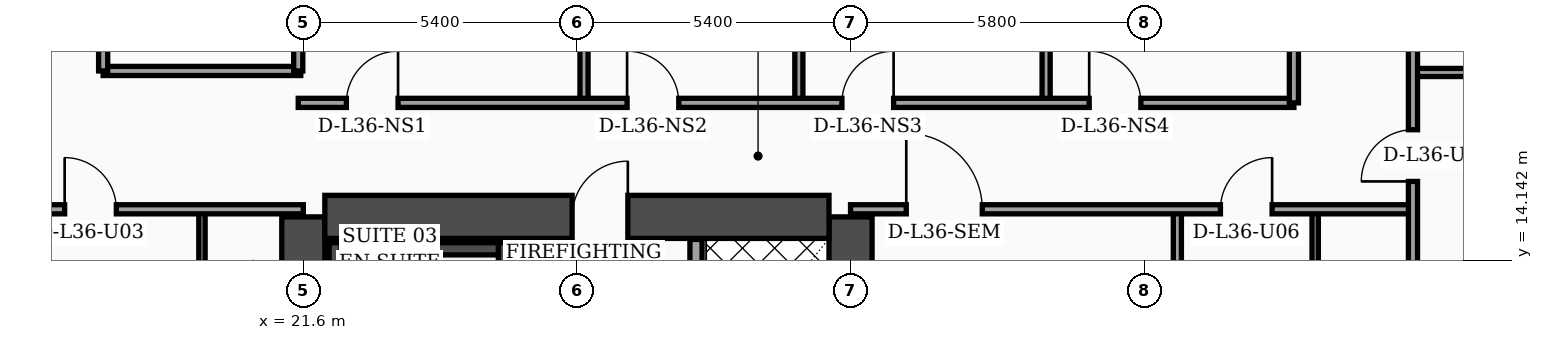
"""IFC4 building model, lengths in metres.
Left out: names, types, materials, properties, quantities, classifications, styles, units other than length and angle.
Written with IfcOpenShell. Run it as: python <this file> out.ifc"""

import sys

from ifc_helpers import new_model, si_unit, direction, frame, frame_2d, origin, place, context, subcontext, project, spatial, rectangle, extrude, element, fill, save


model = new_model("IFC4")
c1 = context("Model", 3, precision=1e-05, world=origin(), true_north=direction((0.0, 1.0)))
c2 = subcontext(c1, "Body", "Model", "MODEL_VIEW")
j1 = project(units=[si_unit("LENGTHUNIT", "METRE"), si_unit("PLANEANGLEUNIT", "RADIAN")], contexts=[c1])
p1 = place(None, origin())
s1 = spatial("IfcSite", under=j1, at=p1, CompositionType="ELEMENT")
p2 = place(p1, origin())
s2 = spatial("IfcBuilding", under=s1, at=p2, CompositionType="ELEMENT")
p3 = place(p2, frame((0.0, 0.0, 148.5)))
s3 = spatial("IfcBuildingStorey", under=s2, at=p3, CompositionType="ELEMENT", Elevation=148.5)
for number, where, z_axis, x_axis in (
    (1, (21.6, 4.6, 0.0), (0.0, 0.0, 1.0), (0.0, 1.0, 0.0)),
    (2, (32.4, 4.6, 0.0), (0.0, 0.0, 1.0), (0.0, 1.0, 0.0)),
):
    element("IfcWall", number, at=place(p3, frame(where, z_axis=z_axis, x_axis=x_axis)), inside=s3, PredefinedType="SHEAR", context=c2, shape_type="SweptSolid", body=[
        extrude(rectangle(XDim=10.4, YDim=0.85, at=frame_2d((5.2, 0.0))), origin(), (0.0, 0.0, 1.0), 3.56),
    ])
p4 = place(p3, frame((22.025, 15.0, 0.0), z_axis=(0.0, 0.0, 1.0), x_axis=(1.0, 0.0, 0.0)))
e3 = element("IfcWall", 3, at=p4, inside=s3, PredefinedType="SHEAR", context=c2, shape_type="SweptSolid", body=[
    extrude(rectangle(XDim=9.95, YDim=0.85, at=frame_2d((4.975, 0.0))), origin(), (0.0, 0.0, 1.0), 3.56),
])
p5 = place(p4, frame((4.88, 0.0, 0.0)))
e4 = element("IfcOpeningElement", 4, at=p5, cuts=e3, PredefinedType="OPENING", context=c2, shape_type="SweptSolid", body=[
    extrude(rectangle(XDim=1.1, YDim=2.2, at=frame_2d((0.55, 1.1))), frame((0.0, 0.435, 0.0), z_axis=(0.0, -1.0, 0.0), x_axis=(1.0, 0.0, 0.0)), (0.0, 0.0, 1.0), 0.87),
])
p6 = place(p3, frame((22.23, 5.025, 0.0), z_axis=(0.0, 0.0, 1.0), x_axis=(0.0, 1.0, 0.0)))
e5 = element("IfcWall", 5, at=p6, inside=s3, PredefinedType="SOLIDWALL", context=c2, shape_type="SweptSolid", body=[
    extrude(rectangle(XDim=9.465, YDim=0.24, at=frame_2d((4.732, 0.0))), origin(), (0.0, 0.0, 1.0), 3.56),
])
p7 = place(p3, frame((25.57, 5.025, 0.0), z_axis=(0.0, 0.0, 1.0), x_axis=(0.0, 1.0, 0.0)))
e6 = element("IfcWall", 6, at=p7, inside=s3, PredefinedType="SOLIDWALL", context=c2, shape_type="SweptSolid", body=[
    extrude(rectangle(XDim=9.465, YDim=0.24, at=frame_2d((4.732, 0.0))), origin(), (0.0, 0.0, 1.0), 3.56),
])
p8 = place(p7, frame((0.35, 0.0, 0.0)))
e7 = element("IfcOpeningElement", 7, at=p8, cuts=e6, PredefinedType="OPENING", context=c2, shape_type="SweptSolid", body=[
    extrude(rectangle(XDim=1.15, YDim=2.2, at=frame_2d((0.575, 1.1))), frame((0.0, 0.13, 0.0), z_axis=(0.0, -1.0, 0.0), x_axis=(1.0, 0.0, 0.0)), (0.0, 0.0, 1.0), 0.26),
])
p9 = place(p3, frame((22.35, 14.37, 0.0), z_axis=(0.0, 0.0, 1.0), x_axis=(1.0, 0.0, 0.0)))
e8 = element("IfcWall", 8, at=p9, inside=s3, PredefinedType="SOLIDWALL", context=c2, shape_type="SweptSolid", body=[
    extrude(rectangle(XDim=3.1, YDim=0.24, at=frame_2d((1.55, 0.0))), origin(), (0.0, 0.0, 1.0), 3.56),
])
p10 = place(p3, frame((29.35, 5.045, 0.0), z_axis=(0.0, 0.0, 1.0), x_axis=(0.0, 1.0, 0.0)))
e9 = element("IfcWall", 9, at=p10, inside=s3, PredefinedType="SOLIDWALL", context=c2, shape_type="SweptSolid", body=[
    extrude(rectangle(XDim=9.51, YDim=0.24, at=frame_2d((4.755, 0.0))), origin(), (0.0, 0.0, 1.0), 3.56),
])
p11 = place(p10, frame((0.55, 0.0, 0.0)))
e10 = element("IfcOpeningElement", 10, at=p11, cuts=e9, PredefinedType="OPENING", context=c2, shape_type="SweptSolid", body=[
    extrude(rectangle(XDim=1.3, YDim=2.35, at=frame_2d((0.65, 1.175))), frame((0.0, 0.13, 0.0), z_axis=(0.0, -1.0, 0.0), x_axis=(1.0, 0.0, 0.0)), (0.0, 0.0, 1.0), 0.26),
])
p12 = place(p3, frame((19.6, 2.44, 0.0), z_axis=(0.0, 0.0, 1.0), x_axis=(0.0, 1.0, 0.0)))
e11 = element("IfcWall", 11, at=p12, inside=s3, PredefinedType="PARTITIONING", context=c2, shape_type="SweptSolid", body=[
    extrude(rectangle(XDim=12.71, YDim=0.125, at=frame_2d((6.355, 0.0))), origin(), (0.0, 0.0, 1.0), 2.49),
])
p13 = place(p12, frame((4.34, 0.0, 0.0)))
e12 = element("IfcOpeningElement", 12, at=p13, cuts=e11, PredefinedType="OPENING", context=c2, shape_type="SweptSolid", body=[
    extrude(rectangle(XDim=0.96, YDim=2.2, at=frame_2d((0.48, 1.1))), frame((0.0, 0.073, 0.0), z_axis=(0.0, -1.0, 0.0), x_axis=(1.0, 0.0, 0.0)), (0.0, 0.0, 1.0), 0.145),
])
p14 = place(p12, frame((10.18, 0.0, 0.0)))
e13 = element("IfcOpeningElement", 13, at=p14, cuts=e11, PredefinedType="OPENING", context=c2, shape_type="SweptSolid", body=[
    extrude(rectangle(XDim=0.9, YDim=2.15, at=frame_2d((0.45, 1.075))), frame((0.0, 0.073, 0.0), z_axis=(0.0, -1.0, 0.0), x_axis=(1.0, 0.0, 0.0)), (0.0, 0.0, 1.0), 0.145),
])
p15 = place(p3, frame((15.15, 15.15, 0.0), z_axis=(0.0, 0.0, 1.0), x_axis=(1.0, 0.0, 0.0)))
e14 = element("IfcWall", 14, at=p15, inside=s3, PredefinedType="PARTITIONING", context=c2, shape_type="SweptSolid", body=[
    extrude(rectangle(XDim=6.45, YDim=0.18, at=frame_2d((3.225, 0.0))), origin(), (0.0, 0.0, 1.0), 2.49),
])
p16 = place(p15, frame((1.74, 0.0, 0.0)))
e15 = element("IfcOpeningElement", 15, at=p16, cuts=e14, PredefinedType="OPENING", context=c2, shape_type="SweptSolid", body=[
    extrude(rectangle(XDim=1.02, YDim=2.2, at=frame_2d((0.51, 1.1))), frame((0.0, 0.1, 0.0), z_axis=(0.0, -1.0, 0.0), x_axis=(1.0, 0.0, 0.0)), (0.0, 0.0, 1.0), 0.2),
])
p17 = place(p3, frame((17.65, 17.88, 0.0), z_axis=(0.0, 0.0, 1.0), x_axis=(1.0, 0.0, 0.0)))
e16 = element("IfcWall", 16, at=p17, inside=s3, PredefinedType="PARTITIONING", context=c2, shape_type="SweptSolid", body=[
    extrude(rectangle(XDim=3.9, YDim=0.18, at=frame_2d((1.95, 0.0))), origin(), (0.0, 0.0, 1.0), 3.09),
])
p18 = place(p3, frame((21.5, 17.88, 0.0), z_axis=(0.0, 0.0, 1.0), x_axis=(0.0, 1.0, 0.0)))
e17 = element("IfcWall", 17, at=p18, inside=s3, PredefinedType="PARTITIONING", context=c2, shape_type="SweptSolid", body=[
    extrude(rectangle(XDim=6.44, YDim=0.18, at=frame_2d((3.22, 0.0))), origin(), (0.0, 0.0, 1.0), 3.09),
])
p19 = place(p3, frame((17.65, 17.88, 0.0), z_axis=(0.0, 0.0, 1.0), x_axis=(0.0, 1.0, 0.0)))
e18 = element("IfcWall", 18, at=p19, inside=s3, PredefinedType="PARTITIONING", context=c2, shape_type="SweptSolid", body=[
    extrude(rectangle(XDim=6.44, YDim=0.18, at=frame_2d((3.22, 0.0))), origin(), (0.0, 0.0, 1.0), 3.09),
])
p20 = place(p19, frame((0.65, 0.0, 0.0)))
e19 = element("IfcOpeningElement", 19, at=p20, cuts=e18, PredefinedType="OPENING", context=c2, shape_type="SweptSolid", body=[
    extrude(rectangle(XDim=0.98, YDim=2.15, at=frame_2d((0.49, 1.075))), frame((0.0, 0.1, 0.0), z_axis=(0.0, -1.0, 0.0), x_axis=(1.0, 0.0, 0.0)), (0.0, 0.0, 1.0), 0.2),
])
p21 = place(p19, frame((3.97, 0.0, 0.0)))
e20 = element("IfcOpeningElement", 20, at=p21, cuts=e18, PredefinedType="OPENING", context=c2, shape_type="SweptSolid", body=[
    extrude(rectangle(XDim=0.96, YDim=2.2, at=frame_2d((0.48, 1.1))), frame((0.0, 0.1, 0.0), z_axis=(0.0, -1.0, 0.0), x_axis=(1.0, 0.0, 0.0)), (0.0, 0.0, 1.0), 0.2),
])
p22 = place(p3, frame((41.57, 2.44, 0.0), z_axis=(0.0, 0.0, 1.0), x_axis=(0.0, 1.0, 0.0)))
e21 = element("IfcWall", 21, at=p22, inside=s3, PredefinedType="PARTITIONING", context=c2, shape_type="SweptSolid", body=[
    extrude(rectangle(XDim=12.71, YDim=0.125, at=frame_2d((6.355, 0.0))), origin(), (0.0, 0.0, 1.0), 3.04),
])
p23 = place(p22, frame((4.35, 0.0, 0.0)))
e22 = element("IfcOpeningElement", 22, at=p23, cuts=e21, PredefinedType="OPENING", context=c2, shape_type="SweptSolid", body=[
    extrude(rectangle(XDim=0.96, YDim=2.2, at=frame_2d((0.48, 1.1))), frame((0.0, 0.073, 0.0), z_axis=(0.0, -1.0, 0.0), x_axis=(1.0, 0.0, 0.0)), (0.0, 0.0, 1.0), 0.145),
])
p24 = place(p22, frame((10.21, 0.0, 0.0)))
e23 = element("IfcOpeningElement", 23, at=p24, cuts=e21, PredefinedType="OPENING", context=c2, shape_type="SweptSolid", body=[
    extrude(rectangle(XDim=0.9, YDim=2.15, at=frame_2d((0.45, 1.075))), frame((0.0, 0.073, 0.0), z_axis=(0.0, -1.0, 0.0), x_axis=(1.0, 0.0, 0.0)), (0.0, 0.0, 1.0), 0.145),
])
p25 = place(p3, frame((38.85, 2.44, 0.0), z_axis=(0.0, 0.0, 1.0), x_axis=(0.0, 1.0, 0.0)))
e24 = element("IfcWall", 24, at=p25, inside=s3, PredefinedType="PARTITIONING", context=c2, shape_type="SweptSolid", body=[
    extrude(rectangle(XDim=12.71, YDim=0.16, at=frame_2d((6.355, 0.0))), origin(), (0.0, 0.0, 1.0), 2.94),
])
p26 = place(p3, frame((32.4, 15.15, 0.0), z_axis=(0.0, 0.0, 1.0), x_axis=(1.0, 0.0, 0.0)))
e25 = element("IfcWall", 25, at=p26, inside=s3, PredefinedType="PARTITIONING", context=c2, shape_type="SweptSolid", body=[
    extrude(rectangle(XDim=11.1, YDim=0.18, at=frame_2d((5.55, 0.0))), origin(), (0.0, 0.0, 1.0), 2.94),
])
p27 = place(p26, frame((1.1, 0.0, 0.0)))
e26 = element("IfcOpeningElement", 26, at=p27, cuts=e25, PredefinedType="OPENING", context=c2, shape_type="SweptSolid", body=[
    extrude(rectangle(XDim=1.5, YDim=2.22, at=frame_2d((0.75, 1.11))), frame((0.0, 0.1, 0.0), z_axis=(0.0, -1.0, 0.0), x_axis=(1.0, 0.0, 0.0)), (0.0, 0.0, 1.0), 0.2),
])
p28 = place(p26, frame((7.3, 0.0, 0.0)))
e27 = element("IfcOpeningElement", 27, at=p28, cuts=e25, PredefinedType="OPENING", context=c2, shape_type="SweptSolid", body=[
    extrude(rectangle(XDim=1.02, YDim=2.2, at=frame_2d((0.51, 1.1))), frame((0.0, 0.1, 0.0), z_axis=(0.0, -1.0, 0.0), x_axis=(1.0, 0.0, 0.0)), (0.0, 0.0, 1.0), 0.2),
])
p29 = place(p3, frame((27.14, 17.25, 0.0), z_axis=(0.0, 0.0, 1.0), x_axis=(0.0, 1.0, 0.0)))
e28 = element("IfcWall", 28, at=p29, inside=s3, PredefinedType="PARTITIONING", context=c2, shape_type="SweptSolid", body=[
    extrude(rectangle(XDim=10.32, YDim=0.16, at=frame_2d((5.16, 0.0))), origin(), (0.0, 0.0, 1.0), 2.94),
])
p30 = place(p3, frame((31.38, 17.25, 0.0), z_axis=(0.0, 0.0, 1.0), x_axis=(0.0, 1.0, 0.0)))
e29 = element("IfcWall", 29, at=p30, inside=s3, PredefinedType="PARTITIONING", context=c2, shape_type="SweptSolid", body=[
    extrude(rectangle(XDim=12.68, YDim=0.16, at=frame_2d((6.34, 0.0))), origin(), (0.0, 0.0, 1.0), 2.94),
])
p31 = place(p3, frame((36.26, 17.25, 0.0), z_axis=(0.0, 0.0, 1.0), x_axis=(0.0, 1.0, 0.0)))
e30 = element("IfcWall", 30, at=p31, inside=s3, PredefinedType="PARTITIONING", context=c2, shape_type="SweptSolid", body=[
    extrude(rectangle(XDim=15.4, YDim=0.16, at=frame_2d((7.7, 0.0))), origin(), (0.0, 0.0, 1.0), 2.94),
])
p32 = place(p3, frame((21.5, 17.25, 0.0), z_axis=(0.0, 0.0, 1.0), x_axis=(1.0, 0.0, 0.0)))
e31 = element("IfcWall", 31, at=p32, inside=s3, PredefinedType="PARTITIONING", context=c2, shape_type="SweptSolid", body=[
    extrude(rectangle(XDim=19.65, YDim=0.18, at=frame_2d((9.825, 0.0))), origin(), (0.0, 0.0, 1.0), 2.94),
])
p33 = place(p32, frame((0.95, 0.0, 0.0)))
e32 = element("IfcOpeningElement", 32, at=p33, cuts=e31, PredefinedType="OPENING", context=c2, shape_type="SweptSolid", body=[
    extrude(rectangle(XDim=1.02, YDim=2.2, at=frame_2d((0.51, 1.1))), frame((0.0, 0.1, 0.0), z_axis=(0.0, -1.0, 0.0), x_axis=(1.0, 0.0, 0.0)), (0.0, 0.0, 1.0), 0.2),
])
p34 = place(p32, frame((6.49, 0.0, 0.0)))
e33 = element("IfcOpeningElement", 33, at=p34, cuts=e31, PredefinedType="OPENING", context=c2, shape_type="SweptSolid", body=[
    extrude(rectangle(XDim=1.02, YDim=2.2, at=frame_2d((0.51, 1.1))), frame((0.0, 0.1, 0.0), z_axis=(0.0, -1.0, 0.0), x_axis=(1.0, 0.0, 0.0)), (0.0, 0.0, 1.0), 0.2),
])
p35 = place(p32, frame((10.73, 0.0, 0.0)))
e34 = element("IfcOpeningElement", 34, at=p35, cuts=e31, PredefinedType="OPENING", context=c2, shape_type="SweptSolid", body=[
    extrude(rectangle(XDim=1.02, YDim=2.2, at=frame_2d((0.51, 1.1))), frame((0.0, 0.1, 0.0), z_axis=(0.0, -1.0, 0.0), x_axis=(1.0, 0.0, 0.0)), (0.0, 0.0, 1.0), 0.2),
])
p36 = place(p32, frame((15.61, 0.0, 0.0)))
e35 = element("IfcOpeningElement", 35, at=p36, cuts=e31, PredefinedType="OPENING", context=c2, shape_type="SweptSolid", body=[
    extrude(rectangle(XDim=1.02, YDim=2.2, at=frame_2d((0.51, 1.1))), frame((0.0, 0.1, 0.0), z_axis=(0.0, -1.0, 0.0), x_axis=(1.0, 0.0, 0.0)), (0.0, 0.0, 1.0), 0.2),
])
p37 = place(p3, frame((41.15, 17.25, 0.0), z_axis=(0.0, 0.0, 1.0), x_axis=(0.0, 1.0, 0.0)))
e36 = element("IfcWall", 36, at=p37, inside=s3, PredefinedType="PARTITIONING", context=c2, shape_type="SweptSolid", body=[
    extrude(rectangle(XDim=18.13, YDim=0.18, at=frame_2d((9.065, 0.0))), origin(), (0.0, 0.0, 1.0), 2.94),
])
p38 = place(p3, frame((43.5, 17.85, 0.0), z_axis=(0.0, 0.0, 1.0), x_axis=(1.0, 0.0, 0.0)))
e37 = element("IfcWall", 37, at=p38, inside=s3, PredefinedType="PARTITIONING", context=c2, shape_type="SweptSolid", body=[
    extrude(rectangle(XDim=11.78, YDim=0.16, at=frame_2d((5.89, 0.0))), origin(), (0.0, 0.0, 1.0), 2.94),
])
p39 = place(p3, frame((43.5, 2.44, 0.0), z_axis=(0.0, 0.0, 1.0), x_axis=(0.0, 1.0, 0.0)))
e38 = element("IfcWall", 38, at=p39, inside=s3, PredefinedType="PARTITIONING", context=c2, shape_type="SweptSolid", body=[
    extrude(rectangle(XDim=31.04, YDim=0.18, at=frame_2d((15.52, 0.0))), origin(), (0.0, 0.0, 1.0), 2.94),
])
p40 = place(p39, frame((13.26, 0.0, 0.0)))
e39 = element("IfcOpeningElement", 39, at=p40, cuts=e38, PredefinedType="OPENING", context=c2, shape_type="SweptSolid", body=[
    extrude(rectangle(XDim=1.02, YDim=2.2, at=frame_2d((0.51, 1.1))), frame((0.0, 0.1, 0.0), z_axis=(0.0, -1.0, 0.0), x_axis=(1.0, 0.0, 0.0)), (0.0, 0.0, 1.0), 0.2),
])
p41 = place(p39, frame((17.77, 0.0, 0.0)))
e40 = element("IfcOpeningElement", 40, at=p41, cuts=e38, PredefinedType="OPENING", context=c2, shape_type="SweptSolid", body=[
    extrude(rectangle(XDim=1.02, YDim=2.2, at=frame_2d((0.51, 1.1))), frame((0.0, 0.1, 0.0), z_axis=(0.0, -1.0, 0.0), x_axis=(1.0, 0.0, 0.0)), (0.0, 0.0, 1.0), 0.2),
])
p42 = place(p39, frame((25.58, 0.0, 0.0)))
e41 = element("IfcOpeningElement", 41, at=p42, cuts=e38, PredefinedType="OPENING", context=c2, shape_type="SweptSolid", body=[
    extrude(rectangle(XDim=1.02, YDim=2.2, at=frame_2d((0.51, 1.1))), frame((0.0, 0.1, 0.0), z_axis=(0.0, -1.0, 0.0), x_axis=(1.0, 0.0, 0.0)), (0.0, 0.0, 1.0), 0.2),
])
p43 = place(p16, origin())
e42 = element("IfcDoor", 42, at=p43, inside=s3, OperationType="SINGLE_SWING_LEFT", PredefinedType="DOOR", context=c2, shape_type="SweptSolid", body=[
    extrude(rectangle(XDim=1.02, YDim=2.2, at=frame_2d((0.51, 1.1))), frame((0.0, 0.025, 0.0), z_axis=(0.0, -1.0, 0.0), x_axis=(1.0, 0.0, 0.0)), (0.0, 0.0, 1.0), 0.05),
])
fill(e15, e42)
p44 = place(p27, origin())
e43 = element("IfcDoor", 43, at=p44, inside=s3, OperationType="SINGLE_SWING_LEFT", PredefinedType="DOOR", context=c2, shape_type="SweptSolid", body=[
    extrude(rectangle(XDim=1.5, YDim=2.22, at=frame_2d((0.75, 1.11))), frame((0.0, 0.025, 0.0), z_axis=(0.0, -1.0, 0.0), x_axis=(1.0, 0.0, 0.0)), (0.0, 0.0, 1.0), 0.05),
])
fill(e26, e43)
p45 = place(p28, origin())
e44 = element("IfcDoor", 44, at=p45, inside=s3, OperationType="SINGLE_SWING_RIGHT", PredefinedType="DOOR", context=c2, shape_type="SweptSolid", body=[
    extrude(rectangle(XDim=1.02, YDim=2.2, at=frame_2d((0.51, 1.1))), frame((0.0, 0.025, 0.0), z_axis=(0.0, -1.0, 0.0), x_axis=(1.0, 0.0, 0.0)), (0.0, 0.0, 1.0), 0.05),
])
fill(e27, e44)
p46 = place(p33, origin())
e45 = element("IfcDoor", 45, at=p46, inside=s3, OperationType="SINGLE_SWING_RIGHT", PredefinedType="DOOR", context=c2, shape_type="SweptSolid", body=[
    extrude(rectangle(XDim=1.02, YDim=2.2, at=frame_2d((0.51, 1.1))), frame((0.0, 0.025, 0.0), z_axis=(0.0, -1.0, 0.0), x_axis=(1.0, 0.0, 0.0)), (0.0, 0.0, 1.0), 0.05),
])
fill(e32, e45)
p47 = place(p34, origin())
e46 = element("IfcDoor", 46, at=p47, inside=s3, OperationType="SINGLE_SWING_LEFT", PredefinedType="DOOR", context=c2, shape_type="SweptSolid", body=[
    extrude(rectangle(XDim=1.02, YDim=2.2, at=frame_2d((0.51, 1.1))), frame((0.0, 0.025, 0.0), z_axis=(0.0, -1.0, 0.0), x_axis=(1.0, 0.0, 0.0)), (0.0, 0.0, 1.0), 0.05),
])
fill(e33, e46)
p48 = place(p35, origin())
e47 = element("IfcDoor", 47, at=p48, inside=s3, OperationType="SINGLE_SWING_RIGHT", PredefinedType="DOOR", context=c2, shape_type="SweptSolid", body=[
    extrude(rectangle(XDim=1.02, YDim=2.2, at=frame_2d((0.51, 1.1))), frame((0.0, 0.025, 0.0), z_axis=(0.0, -1.0, 0.0), x_axis=(1.0, 0.0, 0.0)), (0.0, 0.0, 1.0), 0.05),
])
fill(e34, e47)
p49 = place(p36, origin())
e48 = element("IfcDoor", 48, at=p49, inside=s3, OperationType="SINGLE_SWING_LEFT", PredefinedType="DOOR", context=c2, shape_type="SweptSolid", body=[
    extrude(rectangle(XDim=1.02, YDim=2.2, at=frame_2d((0.51, 1.1))), frame((0.0, 0.025, 0.0), z_axis=(0.0, -1.0, 0.0), x_axis=(1.0, 0.0, 0.0)), (0.0, 0.0, 1.0), 0.05),
])
fill(e35, e48)
p50 = place(p40, origin())
e49 = element("IfcDoor", 49, at=p50, inside=s3, OperationType="SINGLE_SWING_LEFT", PredefinedType="DOOR", context=c2, shape_type="SweptSolid", body=[
    extrude(rectangle(XDim=1.02, YDim=2.2, at=frame_2d((0.51, 1.1))), frame((0.0, 0.025, 0.0), z_axis=(0.0, -1.0, 0.0), x_axis=(1.0, 0.0, 0.0)), (0.0, 0.0, 1.0), 0.05),
])
fill(e39, e49)
p51 = place(p5, origin())
e50 = element("IfcDoor", 50, at=p51, inside=s3, OperationType="SINGLE_SWING_RIGHT", PredefinedType="DOOR", context=c2, shape_type="SweptSolid", body=[
    extrude(rectangle(XDim=1.1, YDim=2.2, at=frame_2d((0.55, 1.1))), frame((0.0, 0.025, 0.0), z_axis=(0.0, -1.0, 0.0), x_axis=(1.0, 0.0, 0.0)), (0.0, 0.0, 1.0), 0.05),
])
fill(e4, e50)
save(model, sys.argv[1])
